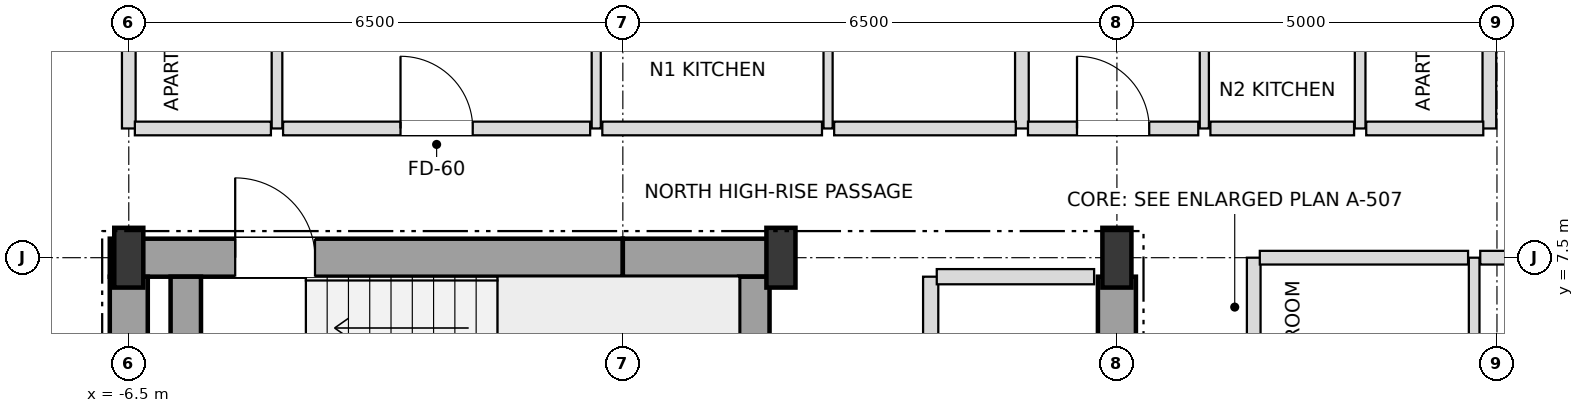
"""IFC4 building model, lengths in metres.
Left out: names, types, materials, properties, quantities, classifications, styles, units other than length and angle.
Written with IfcOpenShell. Run it as: python <this file> out.ifc"""

import sys

from ifc_helpers import new_model, si_unit, direction, frame, frame_2d, origin, origin_2d, place, context, subcontext, project, spatial, rectangle, i_section, extrude, element, fill, save


model = new_model("IFC4")
c1 = context("Model", 3, precision=1e-05, world=origin(), true_north=direction((0.0, 1.0)))
c2 = subcontext(c1, "Body", "Model", "MODEL_VIEW")
j1 = project(units=[si_unit("LENGTHUNIT", "METRE"), si_unit("PLANEANGLEUNIT", "RADIAN")], contexts=[c1])
p1 = place(None, origin())
s1 = spatial("IfcSite", under=j1, at=p1, CompositionType="ELEMENT")
p2 = place(p1, origin())
s2 = spatial("IfcBuilding", under=s1, at=p2, CompositionType="ELEMENT")
p3 = place(p2, frame((0.0, 0.0, 243.9)))
s3 = spatial("IfcBuildingStorey", under=s2, at=p3, CompositionType="ELEMENT", Elevation=243.9)
for number, where, z_axis, x_axis in (
    (1, (-6.5, 7.5, 0.0), (0.0, 0.0, 1.0), (1.0, 0.0, 0.0)),
    (2, (2.08, 7.5, 0.0), (0.0, 0.0, 1.0), (1.0, 0.0, 0.0)),
    (3, (6.5, 7.5, 0.0), (0.0, 0.0, 1.0), (1.0, 0.0, 0.0)),
):
    element("IfcColumn", number, at=place(p3, frame(where, z_axis=z_axis, x_axis=x_axis)), inside=s3, PredefinedType="COLUMN", context=c2, shape_type="SweptSolid", body=[
        extrude(i_section(OverallWidth=0.382, OverallDepth=0.786, WebThickness=0.02, FlangeThickness=0.033, at=origin_2d()), origin(), (0.0, 0.0, 1.0), 3.6),
    ])
p4 = place(p3, frame((-6.75, 7.5, 0.0), z_axis=(0.0, 0.0, 1.0), x_axis=(1.0, 0.0, 0.0)))
e4 = element("IfcWall", 4, at=p4, inside=s3, PredefinedType="SHEAR", context=c2, shape_type="SweptSolid", body=[
    extrude(rectangle(XDim=6.75, YDim=0.5, at=frame_2d((3.375, 0.0))), origin(), (0.0, 0.0, 1.0), 3.38),
])
p5 = place(p4, frame((1.65, 0.0, 0.0)))
e5 = element("IfcOpeningElement", 5, at=p5, cuts=e4, PredefinedType="OPENING", context=c2, shape_type="SweptSolid", body=[
    extrude(rectangle(XDim=1.05, YDim=2.15, at=frame_2d((0.525, 1.075))), frame((0.0, 0.26, 0.0), z_axis=(0.0, -1.0, 0.0), x_axis=(1.0, 0.0, 0.0)), (0.0, 0.0, 1.0), 0.52),
])
p6 = place(p3, frame((0.0, 7.5, 0.0), z_axis=(0.0, 0.0, 1.0), x_axis=(1.0, 0.0, 0.0)))
e6 = element("IfcWall", 6, at=p6, inside=s3, PredefinedType="SHEAR", context=c2, shape_type="SweptSolid", body=[
    extrude(rectangle(XDim=2.08, YDim=0.5, at=frame_2d((1.04, 0.0))), origin(), (0.0, 0.0, 1.0), 3.38),
])
for number, where, z_axis, x_axis in (
    (7, (-6.5, 3.95, 0.0), (0.0, 0.0, 1.0), (0.0, 1.0, 0.0)),
    (8, (6.5, 3.95, 0.0), (0.0, 0.0, 1.0), (0.0, 1.0, 0.0)),
):
    element("IfcWall", number, at=place(p3, frame(where, z_axis=z_axis, x_axis=x_axis)), inside=s3, PredefinedType="SHEAR", context=c2, shape_type="SweptSolid", body=[
        extrude(rectangle(XDim=3.3, YDim=0.5, at=frame_2d((1.65, 0.0))), origin(), (0.0, 0.0, 1.0), 3.38),
    ])
for number, where, z_axis, x_axis in (
    (9, (1.73, 3.95, 0.0), (0.0, 0.0, 1.0), (0.0, 1.0, 0.0)),
    (10, (-5.75, 3.95, 0.0), (0.0, 0.0, 1.0), (0.0, 1.0, 0.0)),
):
    element("IfcWall", number, at=place(p3, frame(where, z_axis=z_axis, x_axis=x_axis)), inside=s3, PredefinedType="SHEAR", context=c2, shape_type="SweptSolid", body=[
        extrude(rectangle(XDim=3.3, YDim=0.4, at=frame_2d((1.65, 0.0))), origin(), (0.0, 0.0, 1.0), 3.38),
    ])
p7 = place(p3, frame((-6.5, 9.2, 0.0), z_axis=(0.0, 0.0, 1.0), x_axis=(0.0, 1.0, 0.0)))
e11 = element("IfcWall", 11, at=p7, inside=s3, PredefinedType="PARTITIONING", context=c2, shape_type="SweptSolid", body=[
    extrude(rectangle(XDim=10.7, YDim=0.18, at=frame_2d((5.35, 0.0))), origin(), (0.0, 0.0, 1.0), 2.826),
])
p8 = place(p3, frame((-4.55, 9.2, 0.0), z_axis=(0.0, 0.0, 1.0), x_axis=(0.0, 1.0, 0.0)))
e12 = element("IfcWall", 12, at=p8, inside=s3, PredefinedType="PARTITIONING", context=c2, shape_type="SweptSolid", body=[
    extrude(rectangle(XDim=4.7, YDim=0.14, at=frame_2d((2.35, 0.0))), origin(), (0.0, 0.0, 1.0), 3.38),
])
p9 = place(p8, frame((1.9, 0.0, 0.0)))
e13 = element("IfcOpeningElement", 13, at=p9, cuts=e12, PredefinedType="OPENING", context=c2, shape_type="SweptSolid", body=[
    extrude(rectangle(XDim=0.9, YDim=2.1, at=frame_2d((0.45, 1.05))), frame((0.0, 0.08, 0.0), z_axis=(0.0, -1.0, 0.0), x_axis=(1.0, 0.0, 0.0)), (0.0, 0.0, 1.0), 0.16),
])
p10 = place(p3, frame((-0.35, 9.2, 0.0), z_axis=(0.0, 0.0, 1.0), x_axis=(0.0, 1.0, 0.0)))
e14 = element("IfcWall", 14, at=p10, inside=s3, PredefinedType="PARTITIONING", context=c2, shape_type="SweptSolid", body=[
    extrude(rectangle(XDim=4.7, YDim=0.12, at=frame_2d((2.35, 0.0))), origin(), (0.0, 0.0, 1.0), 3.38),
])
p11 = place(p10, frame((1.875, 0.0, 0.0)))
e15 = element("IfcOpeningElement", 15, at=p11, cuts=e14, PredefinedType="OPENING", context=c2, shape_type="SweptSolid", body=[
    extrude(rectangle(XDim=0.95, YDim=2.1, at=frame_2d((0.475, 1.05))), frame((0.0, 0.07, 0.0), z_axis=(0.0, -1.0, 0.0), x_axis=(1.0, 0.0, 0.0)), (0.0, 0.0, 1.0), 0.14),
])
p12 = place(p3, frame((2.7, 9.2, 0.0), z_axis=(0.0, 0.0, 1.0), x_axis=(0.0, 1.0, 0.0)))
e16 = element("IfcWall", 16, at=p12, inside=s3, PredefinedType="PARTITIONING", context=c2, shape_type="SweptSolid", body=[
    extrude(rectangle(XDim=4.7, YDim=0.12, at=frame_2d((2.35, 0.0))), origin(), (0.0, 0.0, 1.0), 3.38),
])
p13 = place(p12, frame((1.9, 0.0, 0.0)))
e17 = element("IfcOpeningElement", 17, at=p13, cuts=e16, PredefinedType="OPENING", context=c2, shape_type="SweptSolid", body=[
    extrude(rectangle(XDim=0.9, YDim=2.1, at=frame_2d((0.45, 1.05))), frame((0.0, 0.07, 0.0), z_axis=(0.0, -1.0, 0.0), x_axis=(1.0, 0.0, 0.0)), (0.0, 0.0, 1.0), 0.14),
])
p14 = place(p3, frame((4.05, 4.2, 0.0), z_axis=(0.0, 0.0, 1.0), x_axis=(0.0, 1.0, 0.0)))
e18 = element("IfcWall", 18, at=p14, inside=s3, PredefinedType="SOLIDWALL", context=c2, shape_type="SweptSolid", body=[
    extrude(rectangle(XDim=3.05, YDim=0.2, at=frame_2d((1.525, 0.0))), origin(), (0.0, 0.0, 1.0), 3.38),
])
p15 = place(p14, frame((0.975, 0.0, 0.0)))
e19 = element("IfcOpeningElement", 19, at=p15, cuts=e18, PredefinedType="OPENING", context=c2, shape_type="SweptSolid", body=[
    extrude(rectangle(XDim=0.95, YDim=2.15, at=frame_2d((0.475, 1.075))), frame((0.0, 0.11, 0.0), z_axis=(0.0, -1.0, 0.0), x_axis=(1.0, 0.0, 0.0)), (0.0, 0.0, 1.0), 0.22),
])
p16 = place(p3, frame((5.25, 9.2, 0.0), z_axis=(0.0, 0.0, 1.0), x_axis=(0.0, 1.0, 0.0)))
e20 = element("IfcWall", 20, at=p16, inside=s3, PredefinedType="PARTITIONING", context=c2, shape_type="SweptSolid", body=[
    extrude(rectangle(XDim=10.7, YDim=0.18, at=frame_2d((5.35, 0.0))), origin(), (0.0, 0.0, 1.0), 3.018),
])
p17 = place(p3, frame((7.65, 9.2, 0.0), z_axis=(0.0, 0.0, 1.0), x_axis=(0.0, 1.0, 0.0)))
e21 = element("IfcWall", 21, at=p17, inside=s3, PredefinedType="PARTITIONING", context=c2, shape_type="SweptSolid", body=[
    extrude(rectangle(XDim=4.7, YDim=0.12, at=frame_2d((2.35, 0.0))), origin(), (0.0, 0.0, 1.0), 2.826),
])
p18 = place(p17, frame((1.875, 0.0, 0.0)))
e22 = element("IfcOpeningElement", 22, at=p18, cuts=e21, PredefinedType="OPENING", context=c2, shape_type="SweptSolid", body=[
    extrude(rectangle(XDim=0.95, YDim=2.1, at=frame_2d((0.475, 1.05))), frame((0.0, 0.07, 0.0), z_axis=(0.0, -1.0, 0.0), x_axis=(1.0, 0.0, 0.0)), (0.0, 0.0, 1.0), 0.14),
])
p19 = place(p3, frame((8.3, -7.5, 0.0), z_axis=(0.0, 0.0, 1.0), x_axis=(0.0, 1.0, 0.0)))
e23 = element("IfcWall", 23, at=p19, inside=s3, PredefinedType="PARTITIONING", context=c2, shape_type="SweptSolid", body=[
    extrude(rectangle(XDim=15.0, YDim=0.18, at=frame_2d((7.5, 0.0))), origin(), (0.0, 0.0, 1.0), 3.38),
])
p20 = place(p19, frame((2.355, 0.0, 0.0)))
e24 = element("IfcOpeningElement", 24, at=p20, cuts=e23, PredefinedType="OPENING", context=c2, shape_type="SweptSolid", body=[
    extrude(rectangle(XDim=0.95, YDim=2.15, at=frame_2d((0.475, 1.075))), frame((0.0, 0.1, 0.0), z_axis=(0.0, -1.0, 0.0), x_axis=(1.0, 0.0, 0.0)), (0.0, 0.0, 1.0), 0.2),
])
p21 = place(p3, frame((9.7, 9.2, 0.0), z_axis=(0.0, 0.0, 1.0), x_axis=(0.0, 1.0, 0.0)))
e25 = element("IfcWall", 25, at=p21, inside=s3, PredefinedType="PARTITIONING", context=c2, shape_type="SweptSolid", body=[
    extrude(rectangle(XDim=4.7, YDim=0.14, at=frame_2d((2.35, 0.0))), origin(), (0.0, 0.0, 1.0), 2.826),
])
p22 = place(p21, frame((1.9, 0.0, 0.0)))
e26 = element("IfcOpeningElement", 26, at=p22, cuts=e25, PredefinedType="OPENING", context=c2, shape_type="SweptSolid", body=[
    extrude(rectangle(XDim=0.9, YDim=2.1, at=frame_2d((0.45, 1.05))), frame((0.0, 0.08, 0.0), z_axis=(0.0, -1.0, 0.0), x_axis=(1.0, 0.0, 0.0)), (0.0, 0.0, 1.0), 0.16),
])
p23 = place(p3, frame((11.2, -7.5, 0.0), z_axis=(0.0, 0.0, 1.0), x_axis=(0.0, 1.0, 0.0)))
e27 = element("IfcWall", 27, at=p23, inside=s3, PredefinedType="PARTITIONING", context=c2, shape_type="SweptSolid", body=[
    extrude(rectangle(XDim=15.0, YDim=0.14, at=frame_2d((7.5, 0.0))), origin(), (0.0, 0.0, 1.0), 3.38),
])
p24 = place(p23, frame((3.475, 0.0, 0.0)))
e28 = element("IfcOpeningElement", 28, at=p24, cuts=e27, PredefinedType="OPENING", context=c2, shape_type="SweptSolid", body=[
    extrude(rectangle(XDim=0.95, YDim=2.1, at=frame_2d((0.475, 1.05))), frame((0.0, 0.08, 0.0), z_axis=(0.0, -1.0, 0.0), x_axis=(1.0, 0.0, 0.0)), (0.0, 0.0, 1.0), 0.16),
])
p25 = place(p3, frame((11.4, 9.2, 0.0), z_axis=(0.0, 0.0, 1.0), x_axis=(0.0, 1.0, 0.0)))
e29 = element("IfcWall", 29, at=p25, inside=s3, PredefinedType="PARTITIONING", context=c2, shape_type="SweptSolid", body=[
    extrude(rectangle(XDim=5.07, YDim=0.18, at=frame_2d((2.535, 0.0))), origin(), (0.0, 0.0, 1.0), 2.748),
])
p26 = place(p3, frame((4.13, 7.25, 0.0), z_axis=(0.0, 0.0, 1.0), x_axis=(1.0, 0.0, 0.0)))
e30 = element("IfcWall", 30, at=p26, inside=s3, PredefinedType="SOLIDWALL", context=c2, shape_type="SweptSolid", body=[
    extrude(rectangle(XDim=2.07, YDim=0.2, at=frame_2d((1.035, 0.0))), origin(), (0.0, 0.0, 1.0), 3.38),
])
p27 = place(p3, frame((8.38, 7.5, 0.0), z_axis=(0.0, 0.0, 1.0), x_axis=(1.0, 0.0, 0.0)))
e31 = element("IfcWall", 31, at=p27, inside=s3, PredefinedType="PARTITIONING", context=c2, shape_type="SweptSolid", body=[
    extrude(rectangle(XDim=2.74, YDim=0.18, at=frame_2d((1.37, 0.0))), origin(), (0.0, 0.0, 1.0), 2.826),
])
p28 = place(p3, frame((11.28, 7.5, 0.0), z_axis=(0.0, 0.0, 1.0), x_axis=(1.0, 0.0, 0.0)))
e32 = element("IfcWall", 32, at=p28, inside=s3, PredefinedType="PARTITIONING", context=c2, shape_type="SweptSolid", body=[
    extrude(rectangle(XDim=5.62, YDim=0.18, at=frame_2d((2.81, 0.0))), origin(), (0.0, 0.0, 1.0), 2.826),
])
p29 = place(p3, frame((-6.42, 9.2, 0.0), z_axis=(0.0, 0.0, 1.0), x_axis=(1.0, 0.0, 0.0)))
e33 = element("IfcWall", 33, at=p29, inside=s3, PredefinedType="PARTITIONING", context=c2, shape_type="SweptSolid", body=[
    extrude(rectangle(XDim=1.79, YDim=0.18, at=frame_2d((0.895, 0.0))), origin(), (0.0, 0.0, 1.0), 3.38),
])
p30 = place(p3, frame((-4.47, 9.2, 0.0), z_axis=(0.0, 0.0, 1.0), x_axis=(1.0, 0.0, 0.0)))
e34 = element("IfcWall", 34, at=p30, inside=s3, PredefinedType="PARTITIONING", context=c2, shape_type="SweptSolid", body=[
    extrude(rectangle(XDim=4.04, YDim=0.18, at=frame_2d((2.02, 0.0))), origin(), (0.0, 0.0, 1.0), 3.38),
])
p31 = place(p30, frame((1.545, 0.0, 0.0)))
e35 = element("IfcOpeningElement", 35, at=p31, cuts=e34, PredefinedType="OPENING", context=c2, shape_type="SweptSolid", body=[
    extrude(rectangle(XDim=0.95, YDim=2.15, at=frame_2d((0.475, 1.075))), frame((0.0, 0.1, 0.0), z_axis=(0.0, -1.0, 0.0), x_axis=(1.0, 0.0, 0.0)), (0.0, 0.0, 1.0), 0.2),
])
p32 = place(p3, frame((-0.27, 9.2, 0.0), z_axis=(0.0, 0.0, 1.0), x_axis=(1.0, 0.0, 0.0)))
e36 = element("IfcWall", 36, at=p32, inside=s3, PredefinedType="PARTITIONING", context=c2, shape_type="SweptSolid", body=[
    extrude(rectangle(XDim=2.89, YDim=0.18, at=frame_2d((1.445, 0.0))), origin(), (0.0, 0.0, 1.0), 3.38),
])
p33 = place(p3, frame((2.78, 9.2, 0.0), z_axis=(0.0, 0.0, 1.0), x_axis=(1.0, 0.0, 0.0)))
e37 = element("IfcWall", 37, at=p33, inside=s3, PredefinedType="PARTITIONING", context=c2, shape_type="SweptSolid", body=[
    extrude(rectangle(XDim=2.39, YDim=0.18, at=frame_2d((1.195, 0.0))), origin(), (0.0, 0.0, 1.0), 3.38),
])
p34 = place(p3, frame((5.33, 9.2, 0.0), z_axis=(0.0, 0.0, 1.0), x_axis=(1.0, 0.0, 0.0)))
e38 = element("IfcWall", 38, at=p34, inside=s3, PredefinedType="PARTITIONING", context=c2, shape_type="SweptSolid", body=[
    extrude(rectangle(XDim=2.24, YDim=0.18, at=frame_2d((1.12, 0.0))), origin(), (0.0, 0.0, 1.0), 2.826),
])
p35 = place(p34, frame((0.645, 0.0, 0.0)))
e39 = element("IfcOpeningElement", 39, at=p35, cuts=e38, PredefinedType="OPENING", context=c2, shape_type="SweptSolid", body=[
    extrude(rectangle(XDim=0.95, YDim=2.15, at=frame_2d((0.475, 1.075))), frame((0.0, 0.1, 0.0), z_axis=(0.0, -1.0, 0.0), x_axis=(1.0, 0.0, 0.0)), (0.0, 0.0, 1.0), 0.2),
])
p36 = place(p3, frame((7.73, 9.2, 0.0), z_axis=(0.0, 0.0, 1.0), x_axis=(1.0, 0.0, 0.0)))
e40 = element("IfcWall", 40, at=p36, inside=s3, PredefinedType="PARTITIONING", context=c2, shape_type="SweptSolid", body=[
    extrude(rectangle(XDim=1.89, YDim=0.18, at=frame_2d((0.945, 0.0))), origin(), (0.0, 0.0, 1.0), 3.38),
])
p37 = place(p3, frame((9.78, 9.2, 0.0), z_axis=(0.0, 0.0, 1.0), x_axis=(1.0, 0.0, 0.0)))
e41 = element("IfcWall", 41, at=p37, inside=s3, PredefinedType="PARTITIONING", context=c2, shape_type="SweptSolid", body=[
    extrude(rectangle(XDim=1.54, YDim=0.18, at=frame_2d((0.77, 0.0))), origin(), (0.0, 0.0, 1.0), 3.38),
])
p38 = place(p5, origin())
e42 = element("IfcDoor", 42, at=p38, inside=s3, OperationType="SINGLE_SWING_LEFT", PredefinedType="DOOR", context=c2, shape_type="SweptSolid", body=[
    extrude(rectangle(XDim=1.05, YDim=2.15, at=frame_2d((0.525, 1.075))), frame((0.0, 0.025, 0.0), z_axis=(0.0, -1.0, 0.0), x_axis=(1.0, 0.0, 0.0)), (0.0, 0.0, 1.0), 0.05),
])
fill(e5, e42)
p39 = place(p31, origin())
e43 = element("IfcDoor", 43, at=p39, inside=s3, OperationType="SINGLE_SWING_LEFT", PredefinedType="DOOR", context=c2, shape_type="SweptSolid", body=[
    extrude(rectangle(XDim=0.95, YDim=2.15, at=frame_2d((0.475, 1.075))), frame((0.0, 0.025, 0.0), z_axis=(0.0, -1.0, 0.0), x_axis=(1.0, 0.0, 0.0)), (0.0, 0.0, 1.0), 0.05),
])
fill(e35, e43)
p40 = place(p35, origin())
e44 = element("IfcDoor", 44, at=p40, inside=s3, OperationType="SINGLE_SWING_LEFT", PredefinedType="DOOR", context=c2, shape_type="SweptSolid", body=[
    extrude(rectangle(XDim=0.95, YDim=2.15, at=frame_2d((0.475, 1.075))), frame((0.0, 0.025, 0.0), z_axis=(0.0, -1.0, 0.0), x_axis=(1.0, 0.0, 0.0)), (0.0, 0.0, 1.0), 0.05),
])
fill(e39, e44)
save(model, sys.argv[1])
